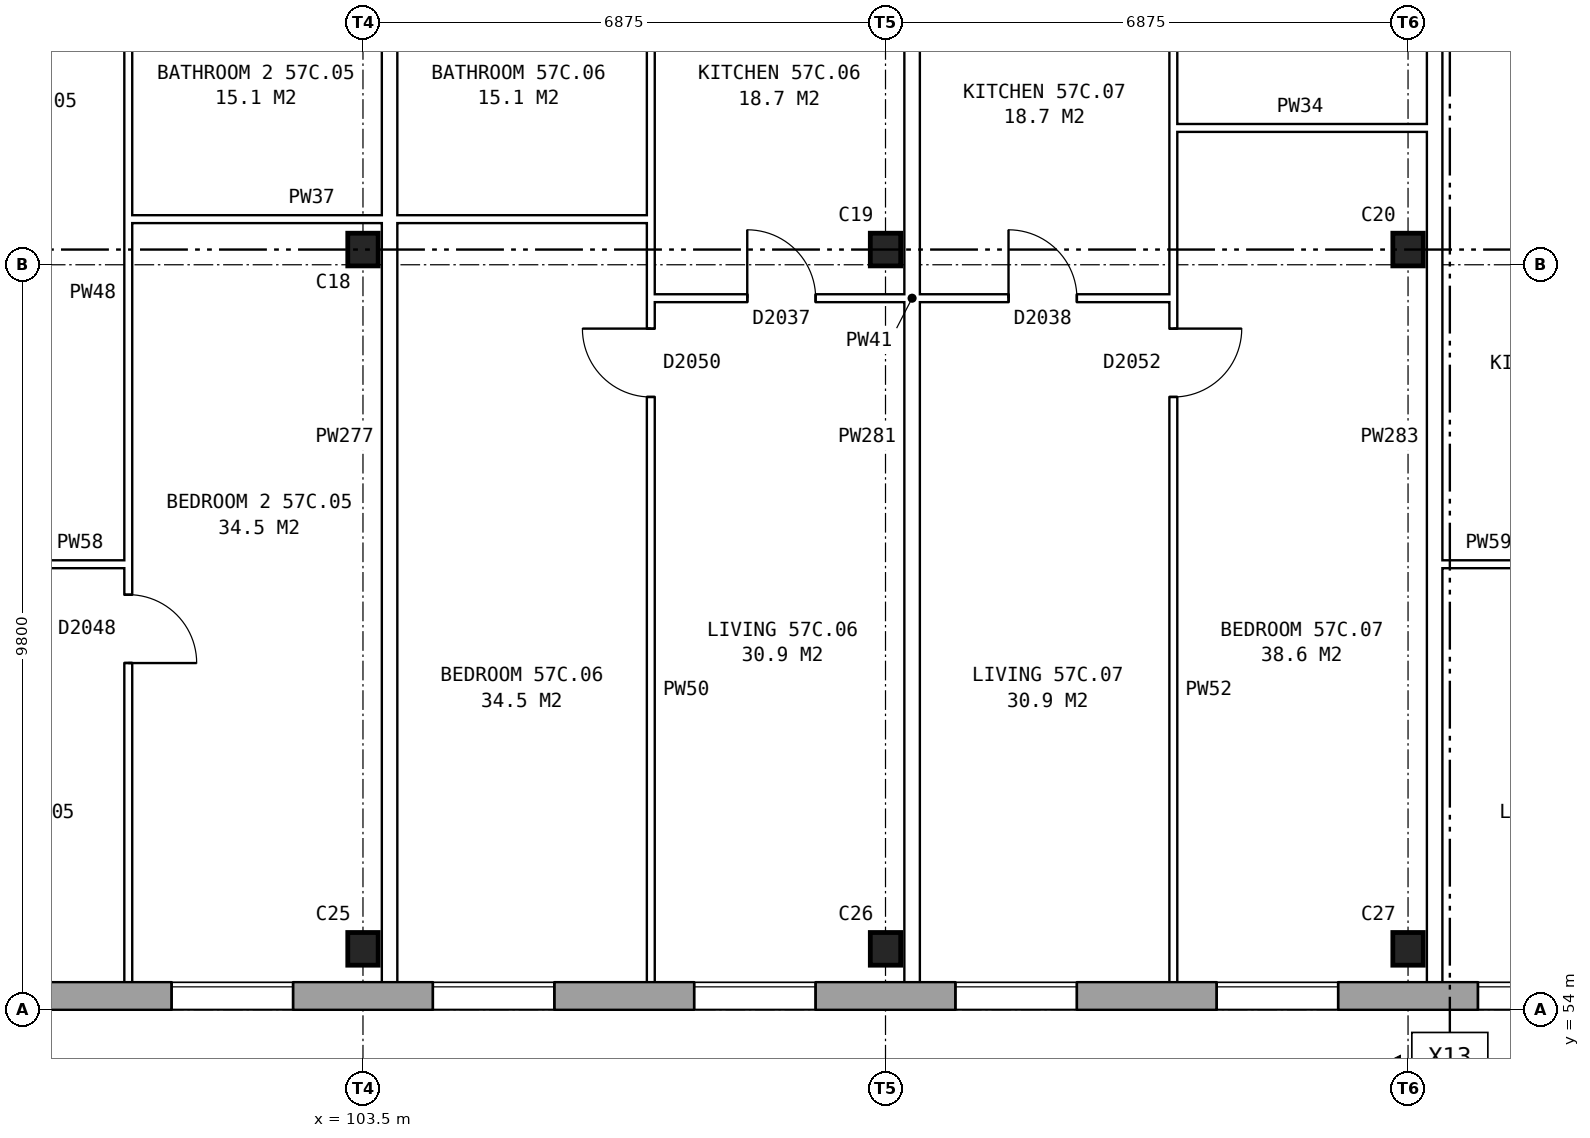
"""IFC4 building model, lengths in metres.
Left out: names, types, materials, properties, quantities, classifications, styles, units other than length and angle.
Written with IfcOpenShell. Run it as: python <this file> out.ifc"""

import sys

from ifc_helpers import new_model, si_unit, direction, frame, frame_2d, origin, origin_2d, place, context, subcontext, project, spatial, rectangle, i_section, extrude, element, fill, save


model = new_model("IFC4")
c1 = context("Model", 3, precision=1e-05, world=origin(), true_north=direction((0.0, 1.0)))
c2 = subcontext(c1, "Body", "Model", "MODEL_VIEW")
j1 = project(units=[si_unit("LENGTHUNIT", "METRE"), si_unit("PLANEANGLEUNIT", "RADIAN")], contexts=[c1])
p1 = place(None, origin())
s1 = spatial("IfcSite", under=j1, at=p1, CompositionType="ELEMENT")
p2 = place(p1, origin())
s2 = spatial("IfcBuilding", under=s1, at=p2, CompositionType="ELEMENT")
p3 = place(p2, frame((0.0, 0.0, 202.8)))
s3 = spatial("IfcBuildingStorey", under=s2, at=p3, CompositionType="ELEMENT", Elevation=202.8)
for number, where, z_axis, x_axis in (
    (1, (103.5, 54.8, 0.0), (0.0, 0.0, 1.0), (1.0, 0.0, 0.0)),
    (2, (110.375, 54.8, 0.0), (0.0, 0.0, 1.0), (1.0, 0.0, 0.0)),
    (3, (117.25, 54.8, 0.0), (0.0, 0.0, 1.0), (1.0, 0.0, 0.0)),
    (4, (103.5, 64.0, 0.0), (0.0, 0.0, 1.0), (1.0, 0.0, 0.0)),
    (5, (110.375, 64.0, 0.0), (0.0, 0.0, 1.0), (1.0, 0.0, 0.0)),
    (6, (117.25, 64.0, 0.0), (0.0, 0.0, 1.0), (1.0, 0.0, 0.0)),
):
    element("IfcColumn", number, at=place(p3, frame(where, z_axis=z_axis, x_axis=x_axis)), inside=s3, PredefinedType="COLUMN", context=c2, shape_type="SweptSolid", body=[
        extrude(i_section(OverallWidth=0.4, OverallDepth=0.43, WebThickness=0.04, FlangeThickness=0.04, at=origin_2d()), origin(), (0.0, 0.0, 1.0), 2.85),
    ])
p4 = place(p3, frame((75.95, 54.18, 0.0), z_axis=(0.0, 0.0, 1.0), x_axis=(1.0, 0.0, 0.0)))
e7 = element("IfcWall", 7, at=p4, inside=s3, PredefinedType="STANDARD", context=c2, shape_type="SweptSolid", body=[
    extrude(rectangle(XDim=55.1, YDim=0.36, at=frame_2d((27.55, 0.0))), origin(), (0.0, 0.0, 1.0), 2.85),
])
p5 = place(p4, frame((0.969, 0.0, 0.8)))
e8 = element("IfcOpeningElement", 8, at=p5, cuts=e7, PredefinedType="OPENING", context=c2, shape_type="SweptSolid", body=[
    extrude(rectangle(XDim=1.6, YDim=1.8, at=frame_2d((0.8, 0.9))), frame((0.0, 0.19, 0.0), z_axis=(0.0, -1.0, 0.0), x_axis=(1.0, 0.0, 0.0)), (0.0, 0.0, 1.0), 0.38),
])
p6 = place(p4, frame((4.406, 0.0, 0.8)))
e9 = element("IfcOpeningElement", 9, at=p6, cuts=e7, PredefinedType="OPENING", context=c2, shape_type="SweptSolid", body=[
    extrude(rectangle(XDim=1.6, YDim=1.8, at=frame_2d((0.8, 0.9))), frame((0.0, 0.19, 0.0), z_axis=(0.0, -1.0, 0.0), x_axis=(1.0, 0.0, 0.0)), (0.0, 0.0, 1.0), 0.38),
])
p7 = place(p4, frame((7.844, 0.0, 0.8)))
e10 = element("IfcOpeningElement", 10, at=p7, cuts=e7, PredefinedType="OPENING", context=c2, shape_type="SweptSolid", body=[
    extrude(rectangle(XDim=1.6, YDim=1.8, at=frame_2d((0.8, 0.9))), frame((0.0, 0.19, 0.0), z_axis=(0.0, -1.0, 0.0), x_axis=(1.0, 0.0, 0.0)), (0.0, 0.0, 1.0), 0.38),
])
p8 = place(p4, frame((11.281, 0.0, 0.8)))
e11 = element("IfcOpeningElement", 11, at=p8, cuts=e7, PredefinedType="OPENING", context=c2, shape_type="SweptSolid", body=[
    extrude(rectangle(XDim=1.6, YDim=1.8, at=frame_2d((0.8, 0.9))), frame((0.0, 0.19, 0.0), z_axis=(0.0, -1.0, 0.0), x_axis=(1.0, 0.0, 0.0)), (0.0, 0.0, 1.0), 0.38),
])
p9 = place(p4, frame((14.719, 0.0, 0.8)))
e12 = element("IfcOpeningElement", 12, at=p9, cuts=e7, PredefinedType="OPENING", context=c2, shape_type="SweptSolid", body=[
    extrude(rectangle(XDim=1.6, YDim=1.8, at=frame_2d((0.8, 0.9))), frame((0.0, 0.19, 0.0), z_axis=(0.0, -1.0, 0.0), x_axis=(1.0, 0.0, 0.0)), (0.0, 0.0, 1.0), 0.38),
])
p10 = place(p4, frame((18.156, 0.0, 0.8)))
e13 = element("IfcOpeningElement", 13, at=p10, cuts=e7, PredefinedType="OPENING", context=c2, shape_type="SweptSolid", body=[
    extrude(rectangle(XDim=1.6, YDim=1.8, at=frame_2d((0.8, 0.9))), frame((0.0, 0.19, 0.0), z_axis=(0.0, -1.0, 0.0), x_axis=(1.0, 0.0, 0.0)), (0.0, 0.0, 1.0), 0.38),
])
p11 = place(p4, frame((21.594, 0.0, 0.8)))
e14 = element("IfcOpeningElement", 14, at=p11, cuts=e7, PredefinedType="OPENING", context=c2, shape_type="SweptSolid", body=[
    extrude(rectangle(XDim=1.6, YDim=1.8, at=frame_2d((0.8, 0.9))), frame((0.0, 0.19, 0.0), z_axis=(0.0, -1.0, 0.0), x_axis=(1.0, 0.0, 0.0)), (0.0, 0.0, 1.0), 0.38),
])
p12 = place(p4, frame((25.031, 0.0, 0.8)))
e15 = element("IfcOpeningElement", 15, at=p12, cuts=e7, PredefinedType="OPENING", context=c2, shape_type="SweptSolid", body=[
    extrude(rectangle(XDim=1.6, YDim=1.8, at=frame_2d((0.8, 0.9))), frame((0.0, 0.19, 0.0), z_axis=(0.0, -1.0, 0.0), x_axis=(1.0, 0.0, 0.0)), (0.0, 0.0, 1.0), 0.38),
])
p13 = place(p4, frame((28.469, 0.0, 0.8)))
e16 = element("IfcOpeningElement", 16, at=p13, cuts=e7, PredefinedType="OPENING", context=c2, shape_type="SweptSolid", body=[
    extrude(rectangle(XDim=1.6, YDim=1.8, at=frame_2d((0.8, 0.9))), frame((0.0, 0.19, 0.0), z_axis=(0.0, -1.0, 0.0), x_axis=(1.0, 0.0, 0.0)), (0.0, 0.0, 1.0), 0.38),
])
p14 = place(p4, frame((31.906, 0.0, 0.8)))
e17 = element("IfcOpeningElement", 17, at=p14, cuts=e7, PredefinedType="OPENING", context=c2, shape_type="SweptSolid", body=[
    extrude(rectangle(XDim=1.6, YDim=1.8, at=frame_2d((0.8, 0.9))), frame((0.0, 0.19, 0.0), z_axis=(0.0, -1.0, 0.0), x_axis=(1.0, 0.0, 0.0)), (0.0, 0.0, 1.0), 0.38),
])
p15 = place(p4, frame((35.344, 0.0, 0.8)))
e18 = element("IfcOpeningElement", 18, at=p15, cuts=e7, PredefinedType="OPENING", context=c2, shape_type="SweptSolid", body=[
    extrude(rectangle(XDim=1.6, YDim=1.8, at=frame_2d((0.8, 0.9))), frame((0.0, 0.19, 0.0), z_axis=(0.0, -1.0, 0.0), x_axis=(1.0, 0.0, 0.0)), (0.0, 0.0, 1.0), 0.38),
])
p16 = place(p4, frame((38.781, 0.0, 0.8)))
e19 = element("IfcOpeningElement", 19, at=p16, cuts=e7, PredefinedType="OPENING", context=c2, shape_type="SweptSolid", body=[
    extrude(rectangle(XDim=1.6, YDim=1.8, at=frame_2d((0.8, 0.9))), frame((0.0, 0.19, 0.0), z_axis=(0.0, -1.0, 0.0), x_axis=(1.0, 0.0, 0.0)), (0.0, 0.0, 1.0), 0.38),
])
p17 = place(p4, frame((42.219, 0.0, 0.8)))
e20 = element("IfcOpeningElement", 20, at=p17, cuts=e7, PredefinedType="OPENING", context=c2, shape_type="SweptSolid", body=[
    extrude(rectangle(XDim=1.6, YDim=1.8, at=frame_2d((0.8, 0.9))), frame((0.0, 0.19, 0.0), z_axis=(0.0, -1.0, 0.0), x_axis=(1.0, 0.0, 0.0)), (0.0, 0.0, 1.0), 0.38),
])
p18 = place(p4, frame((45.656, 0.0, 0.8)))
e21 = element("IfcOpeningElement", 21, at=p18, cuts=e7, PredefinedType="OPENING", context=c2, shape_type="SweptSolid", body=[
    extrude(rectangle(XDim=1.6, YDim=1.8, at=frame_2d((0.8, 0.9))), frame((0.0, 0.19, 0.0), z_axis=(0.0, -1.0, 0.0), x_axis=(1.0, 0.0, 0.0)), (0.0, 0.0, 1.0), 0.38),
])
p19 = place(p4, frame((49.094, 0.0, 0.8)))
e22 = element("IfcOpeningElement", 22, at=p19, cuts=e7, PredefinedType="OPENING", context=c2, shape_type="SweptSolid", body=[
    extrude(rectangle(XDim=1.6, YDim=1.8, at=frame_2d((0.8, 0.9))), frame((0.0, 0.19, 0.0), z_axis=(0.0, -1.0, 0.0), x_axis=(1.0, 0.0, 0.0)), (0.0, 0.0, 1.0), 0.38),
])
p20 = place(p4, frame((52.531, 0.0, 0.8)))
e23 = element("IfcOpeningElement", 23, at=p20, cuts=e7, PredefinedType="OPENING", context=c2, shape_type="SweptSolid", body=[
    extrude(rectangle(XDim=1.6, YDim=1.8, at=frame_2d((0.8, 0.9))), frame((0.0, 0.19, 0.0), z_axis=(0.0, -1.0, 0.0), x_axis=(1.0, 0.0, 0.0)), (0.0, 0.0, 1.0), 0.38),
])
p21 = place(p3, frame((96.975, 59.86, 0.0), z_axis=(0.0, 0.0, 1.0), x_axis=(1.0, 0.0, 0.0)))
e24 = element("IfcWall", 24, at=p21, inside=s3, PredefinedType="PARTITIONING", context=c2, shape_type="SweptSolid", body=[
    extrude(rectangle(XDim=3.437, YDim=0.1, at=frame_2d((1.719, 0.0))), origin(), (0.0, 0.0, 1.0), 2.85),
])
p22 = place(p21, frame((1.269, 0.0, 0.0)))
e25 = element("IfcOpeningElement", 25, at=p22, cuts=e24, PredefinedType="OPENING", context=c2, shape_type="SweptSolid", body=[
    extrude(rectangle(XDim=0.9, YDim=2.1, at=frame_2d((0.45, 1.05))), frame((0.0, 0.06, 0.0), z_axis=(0.0, -1.0, 0.0), x_axis=(1.0, 0.0, 0.0)), (0.0, 0.0, 1.0), 0.12),
])
p23 = place(p3, frame((117.7, 59.86, 0.0), z_axis=(0.0, 0.0, 1.0), x_axis=(1.0, 0.0, 0.0)))
e26 = element("IfcWall", 26, at=p23, inside=s3, PredefinedType="PARTITIONING", context=c2, shape_type="SweptSolid", body=[
    extrude(rectangle(XDim=3.337, YDim=0.1, at=frame_2d((1.668, 0.0))), origin(), (0.0, 0.0, 1.0), 2.85),
])
p24 = place(p23, frame((1.219, 0.0, 0.0)))
e27 = element("IfcOpeningElement", 27, at=p24, cuts=e26, PredefinedType="OPENING", context=c2, shape_type="SweptSolid", body=[
    extrude(rectangle(XDim=0.9, YDim=2.1, at=frame_2d((0.45, 1.05))), frame((0.0, 0.06, 0.0), z_axis=(0.0, -1.0, 0.0), x_axis=(1.0, 0.0, 0.0)), (0.0, 0.0, 1.0), 0.12),
])
p25 = place(p3, frame((107.287, 63.36, 0.0), z_axis=(0.0, 0.0, 1.0), x_axis=(1.0, 0.0, 0.0)))
e28 = element("IfcWall", 28, at=p25, inside=s3, PredefinedType="PARTITIONING", context=c2, shape_type="SweptSolid", body=[
    extrude(rectangle(XDim=6.875, YDim=0.1, at=frame_2d((3.438, 0.0))), origin(), (0.0, 0.0, 1.0), 2.85),
])
p26 = place(p25, frame((1.269, 0.0, 0.0)))
e29 = element("IfcOpeningElement", 29, at=p26, cuts=e28, PredefinedType="OPENING", context=c2, shape_type="SweptSolid", body=[
    extrude(rectangle(XDim=0.9, YDim=2.1, at=frame_2d((0.45, 1.05))), frame((0.0, 0.06, 0.0), z_axis=(0.0, -1.0, 0.0), x_axis=(1.0, 0.0, 0.0)), (0.0, 0.0, 1.0), 0.12),
])
p27 = place(p25, frame((4.707, 0.0, 0.0)))
e30 = element("IfcOpeningElement", 30, at=p27, cuts=e28, PredefinedType="OPENING", context=c2, shape_type="SweptSolid", body=[
    extrude(rectangle(XDim=0.9, YDim=2.1, at=frame_2d((0.45, 1.05))), frame((0.0, 0.06, 0.0), z_axis=(0.0, -1.0, 0.0), x_axis=(1.0, 0.0, 0.0)), (0.0, 0.0, 1.0), 0.12),
])
p28 = place(p3, frame((100.412, 64.4, 0.0), z_axis=(0.0, 0.0, 1.0), x_axis=(1.0, 0.0, 0.0)))
e31 = element("IfcWall", 31, at=p28, inside=s3, PredefinedType="PARTITIONING", context=c2, shape_type="SweptSolid", body=[
    extrude(rectangle(XDim=6.875, YDim=0.1, at=frame_2d((3.438, 0.0))), origin(), (0.0, 0.0, 1.0), 2.85),
])
p29 = place(p3, frame((114.162, 65.6, 0.0), z_axis=(0.0, 0.0, 1.0), x_axis=(1.0, 0.0, 0.0)))
e32 = element("IfcWall", 32, at=p29, inside=s3, PredefinedType="PARTITIONING", context=c2, shape_type="SweptSolid", body=[
    extrude(rectangle(XDim=3.338, YDim=0.1, at=frame_2d((1.669, 0.0))), origin(), (0.0, 0.0, 1.0), 2.85),
])
p30 = place(p3, frame((100.412, 54.36, 0.0), z_axis=(0.0, 0.0, 1.0), x_axis=(0.0, 1.0, 0.0)))
e33 = element("IfcWall", 33, at=p30, inside=s3, PredefinedType="PARTITIONING", context=c2, shape_type="SweptSolid", body=[
    extrude(rectangle(XDim=14.34, YDim=0.1, at=frame_2d((7.17, 0.0))), origin(), (0.0, 0.0, 1.0), 2.85),
])
p31 = place(p30, frame((4.2, 0.0, 0.0)))
e34 = element("IfcOpeningElement", 34, at=p31, cuts=e33, PredefinedType="OPENING", context=c2, shape_type="SweptSolid", body=[
    extrude(rectangle(XDim=0.9, YDim=2.1, at=frame_2d((0.45, 1.05))), frame((0.0, 0.06, 0.0), z_axis=(0.0, -1.0, 0.0), x_axis=(1.0, 0.0, 0.0)), (0.0, 0.0, 1.0), 0.12),
])
p32 = place(p30, frame((13.04, 0.0, 0.0)))
e35 = element("IfcOpeningElement", 35, at=p32, cuts=e33, PredefinedType="OPENING", context=c2, shape_type="SweptSolid", body=[
    extrude(rectangle(XDim=0.9, YDim=2.1, at=frame_2d((0.45, 1.05))), frame((0.0, 0.06, 0.0), z_axis=(0.0, -1.0, 0.0), x_axis=(1.0, 0.0, 0.0)), (0.0, 0.0, 1.0), 0.12),
])
p33 = place(p3, frame((103.85, 54.36, 0.0), z_axis=(0.0, 0.0, 1.0), x_axis=(0.0, 1.0, 0.0)))
e36 = element("IfcWall", 36, at=p33, inside=s3, PredefinedType="PARTITIONING", context=c2, shape_type="SweptSolid", body=[
    extrude(rectangle(XDim=14.34, YDim=0.2, at=frame_2d((7.17, 0.0))), origin(), (0.0, 0.0, 1.0), 2.85),
])
p34 = place(p3, frame((107.287, 54.36, 0.0), z_axis=(0.0, 0.0, 1.0), x_axis=(0.0, 1.0, 0.0)))
e37 = element("IfcWall", 37, at=p34, inside=s3, PredefinedType="PARTITIONING", context=c2, shape_type="SweptSolid", body=[
    extrude(rectangle(XDim=14.34, YDim=0.1, at=frame_2d((7.17, 0.0))), origin(), (0.0, 0.0, 1.0), 2.85),
])
p35 = place(p34, frame((7.7, 0.0, 0.0)))
e38 = element("IfcOpeningElement", 38, at=p35, cuts=e37, PredefinedType="OPENING", context=c2, shape_type="SweptSolid", body=[
    extrude(rectangle(XDim=0.9, YDim=2.1, at=frame_2d((0.45, 1.05))), frame((0.0, 0.06, 0.0), z_axis=(0.0, -1.0, 0.0), x_axis=(1.0, 0.0, 0.0)), (0.0, 0.0, 1.0), 0.12),
])
p36 = place(p34, frame((13.04, 0.0, 0.0)))
e39 = element("IfcOpeningElement", 39, at=p36, cuts=e37, PredefinedType="OPENING", context=c2, shape_type="SweptSolid", body=[
    extrude(rectangle(XDim=0.9, YDim=2.1, at=frame_2d((0.45, 1.05))), frame((0.0, 0.06, 0.0), z_axis=(0.0, -1.0, 0.0), x_axis=(1.0, 0.0, 0.0)), (0.0, 0.0, 1.0), 0.12),
])
p37 = place(p3, frame((110.725, 54.36, 0.0), z_axis=(0.0, 0.0, 1.0), x_axis=(0.0, 1.0, 0.0)))
e40 = element("IfcWall", 40, at=p37, inside=s3, PredefinedType="PARTITIONING", context=c2, shape_type="SweptSolid", body=[
    extrude(rectangle(XDim=14.34, YDim=0.2, at=frame_2d((7.17, 0.0))), origin(), (0.0, 0.0, 1.0), 2.85),
])
p38 = place(p3, frame((114.162, 54.36, 0.0), z_axis=(0.0, 0.0, 1.0), x_axis=(0.0, 1.0, 0.0)))
e41 = element("IfcWall", 41, at=p38, inside=s3, PredefinedType="PARTITIONING", context=c2, shape_type="SweptSolid", body=[
    extrude(rectangle(XDim=14.34, YDim=0.1, at=frame_2d((7.17, 0.0))), origin(), (0.0, 0.0, 1.0), 2.85),
])
p39 = place(p38, frame((7.7, 0.0, 0.0)))
e42 = element("IfcOpeningElement", 42, at=p39, cuts=e41, PredefinedType="OPENING", context=c2, shape_type="SweptSolid", body=[
    extrude(rectangle(XDim=0.9, YDim=2.1, at=frame_2d((0.45, 1.05))), frame((0.0, 0.06, 0.0), z_axis=(0.0, -1.0, 0.0), x_axis=(1.0, 0.0, 0.0)), (0.0, 0.0, 1.0), 0.12),
])
p40 = place(p38, frame((13.04, 0.0, 0.0)))
e43 = element("IfcOpeningElement", 43, at=p40, cuts=e41, PredefinedType="OPENING", context=c2, shape_type="SweptSolid", body=[
    extrude(rectangle(XDim=0.9, YDim=2.1, at=frame_2d((0.45, 1.05))), frame((0.0, 0.06, 0.0), z_axis=(0.0, -1.0, 0.0), x_axis=(1.0, 0.0, 0.0)), (0.0, 0.0, 1.0), 0.12),
])
p41 = place(p3, frame((117.6, 54.36, 0.0), z_axis=(0.0, 0.0, 1.0), x_axis=(0.0, 1.0, 0.0)))
e44 = element("IfcWall", 44, at=p41, inside=s3, PredefinedType="PARTITIONING", context=c2, shape_type="SweptSolid", body=[
    extrude(rectangle(XDim=14.34, YDim=0.2, at=frame_2d((7.17, 0.0))), origin(), (0.0, 0.0, 1.0), 2.85),
])
p42 = place(p12, origin())
e45 = element("IfcWindow", 45, at=p42, inside=s3, PartitioningType="SINGLE_PANEL", PredefinedType="WINDOW", context=c2, shape_type="SweptSolid", body=[
    extrude(rectangle(XDim=1.6, YDim=1.8, at=frame_2d((0.8, 0.9))), frame((0.0, 0.15, 0.0), z_axis=(0.0, -1.0, 0.0), x_axis=(1.0, 0.0, 0.0)), (0.0, 0.0, 1.0), 0.06),
])
fill(e15, e45)
p43 = place(p13, origin())
e46 = element("IfcWindow", 46, at=p43, inside=s3, PartitioningType="SINGLE_PANEL", PredefinedType="WINDOW", context=c2, shape_type="SweptSolid", body=[
    extrude(rectangle(XDim=1.6, YDim=1.8, at=frame_2d((0.8, 0.9))), frame((0.0, 0.15, 0.0), z_axis=(0.0, -1.0, 0.0), x_axis=(1.0, 0.0, 0.0)), (0.0, 0.0, 1.0), 0.06),
])
fill(e16, e46)
p44 = place(p14, origin())
e47 = element("IfcWindow", 47, at=p44, inside=s3, PartitioningType="SINGLE_PANEL", PredefinedType="WINDOW", context=c2, shape_type="SweptSolid", body=[
    extrude(rectangle(XDim=1.6, YDim=1.8, at=frame_2d((0.8, 0.9))), frame((0.0, 0.15, 0.0), z_axis=(0.0, -1.0, 0.0), x_axis=(1.0, 0.0, 0.0)), (0.0, 0.0, 1.0), 0.06),
])
fill(e17, e47)
p45 = place(p15, origin())
e48 = element("IfcWindow", 48, at=p45, inside=s3, PartitioningType="SINGLE_PANEL", PredefinedType="WINDOW", context=c2, shape_type="SweptSolid", body=[
    extrude(rectangle(XDim=1.6, YDim=1.8, at=frame_2d((0.8, 0.9))), frame((0.0, 0.15, 0.0), z_axis=(0.0, -1.0, 0.0), x_axis=(1.0, 0.0, 0.0)), (0.0, 0.0, 1.0), 0.06),
])
fill(e18, e48)
p46 = place(p16, origin())
e49 = element("IfcWindow", 49, at=p46, inside=s3, PartitioningType="SINGLE_PANEL", PredefinedType="WINDOW", context=c2, shape_type="SweptSolid", body=[
    extrude(rectangle(XDim=1.6, YDim=1.8, at=frame_2d((0.8, 0.9))), frame((0.0, 0.15, 0.0), z_axis=(0.0, -1.0, 0.0), x_axis=(1.0, 0.0, 0.0)), (0.0, 0.0, 1.0), 0.06),
])
fill(e19, e49)
p47 = place(p17, origin())
e50 = element("IfcWindow", 50, at=p47, inside=s3, PartitioningType="SINGLE_PANEL", PredefinedType="WINDOW", context=c2, shape_type="SweptSolid", body=[
    extrude(rectangle(XDim=1.6, YDim=1.8, at=frame_2d((0.8, 0.9))), frame((0.0, 0.15, 0.0), z_axis=(0.0, -1.0, 0.0), x_axis=(1.0, 0.0, 0.0)), (0.0, 0.0, 1.0), 0.06),
])
fill(e20, e50)
p48 = place(p31, frame((0.9, 0.0, 0.0), z_axis=(0.0, 0.0, 1.0), x_axis=(-1.0, 0.0, 0.0)))
e51 = element("IfcDoor", 51, at=p48, inside=s3, OperationType="SINGLE_SWING_RIGHT", PredefinedType="DOOR", context=c2, shape_type="SweptSolid", body=[
    extrude(rectangle(XDim=0.9, YDim=2.1, at=frame_2d((0.45, 1.05))), frame((0.0, 0.025, 0.0), z_axis=(0.0, -1.0, 0.0), x_axis=(1.0, 0.0, 0.0)), (0.0, 0.0, 1.0), 0.05),
])
fill(e34, e51)
p49 = place(p35, origin())
e52 = element("IfcDoor", 52, at=p49, inside=s3, OperationType="SINGLE_SWING_RIGHT", PredefinedType="DOOR", context=c2, shape_type="SweptSolid", body=[
    extrude(rectangle(XDim=0.9, YDim=2.1, at=frame_2d((0.45, 1.05))), frame((0.0, 0.025, 0.0), z_axis=(0.0, -1.0, 0.0), x_axis=(1.0, 0.0, 0.0)), (0.0, 0.0, 1.0), 0.05),
])
fill(e38, e52)
p50 = place(p26, origin())
e53 = element("IfcDoor", 53, at=p50, inside=s3, OperationType="SINGLE_SWING_LEFT", PredefinedType="DOOR", context=c2, shape_type="SweptSolid", body=[
    extrude(rectangle(XDim=0.9, YDim=2.1, at=frame_2d((0.45, 1.05))), frame((0.0, 0.025, 0.0), z_axis=(0.0, -1.0, 0.0), x_axis=(1.0, 0.0, 0.0)), (0.0, 0.0, 1.0), 0.05),
])
fill(e29, e53)
p51 = place(p39, frame((0.9, 0.0, 0.0), z_axis=(0.0, 0.0, 1.0), x_axis=(-1.0, 0.0, 0.0)))
e54 = element("IfcDoor", 54, at=p51, inside=s3, OperationType="SINGLE_SWING_LEFT", PredefinedType="DOOR", context=c2, shape_type="SweptSolid", body=[
    extrude(rectangle(XDim=0.9, YDim=2.1, at=frame_2d((0.45, 1.05))), frame((0.0, 0.025, 0.0), z_axis=(0.0, -1.0, 0.0), x_axis=(1.0, 0.0, 0.0)), (0.0, 0.0, 1.0), 0.05),
])
fill(e42, e54)
p52 = place(p27, origin())
e55 = element("IfcDoor", 55, at=p52, inside=s3, OperationType="SINGLE_SWING_LEFT", PredefinedType="DOOR", context=c2, shape_type="SweptSolid", body=[
    extrude(rectangle(XDim=0.9, YDim=2.1, at=frame_2d((0.45, 1.05))), frame((0.0, 0.025, 0.0), z_axis=(0.0, -1.0, 0.0), x_axis=(1.0, 0.0, 0.0)), (0.0, 0.0, 1.0), 0.05),
])
fill(e30, e55)
save(model, sys.argv[1])
